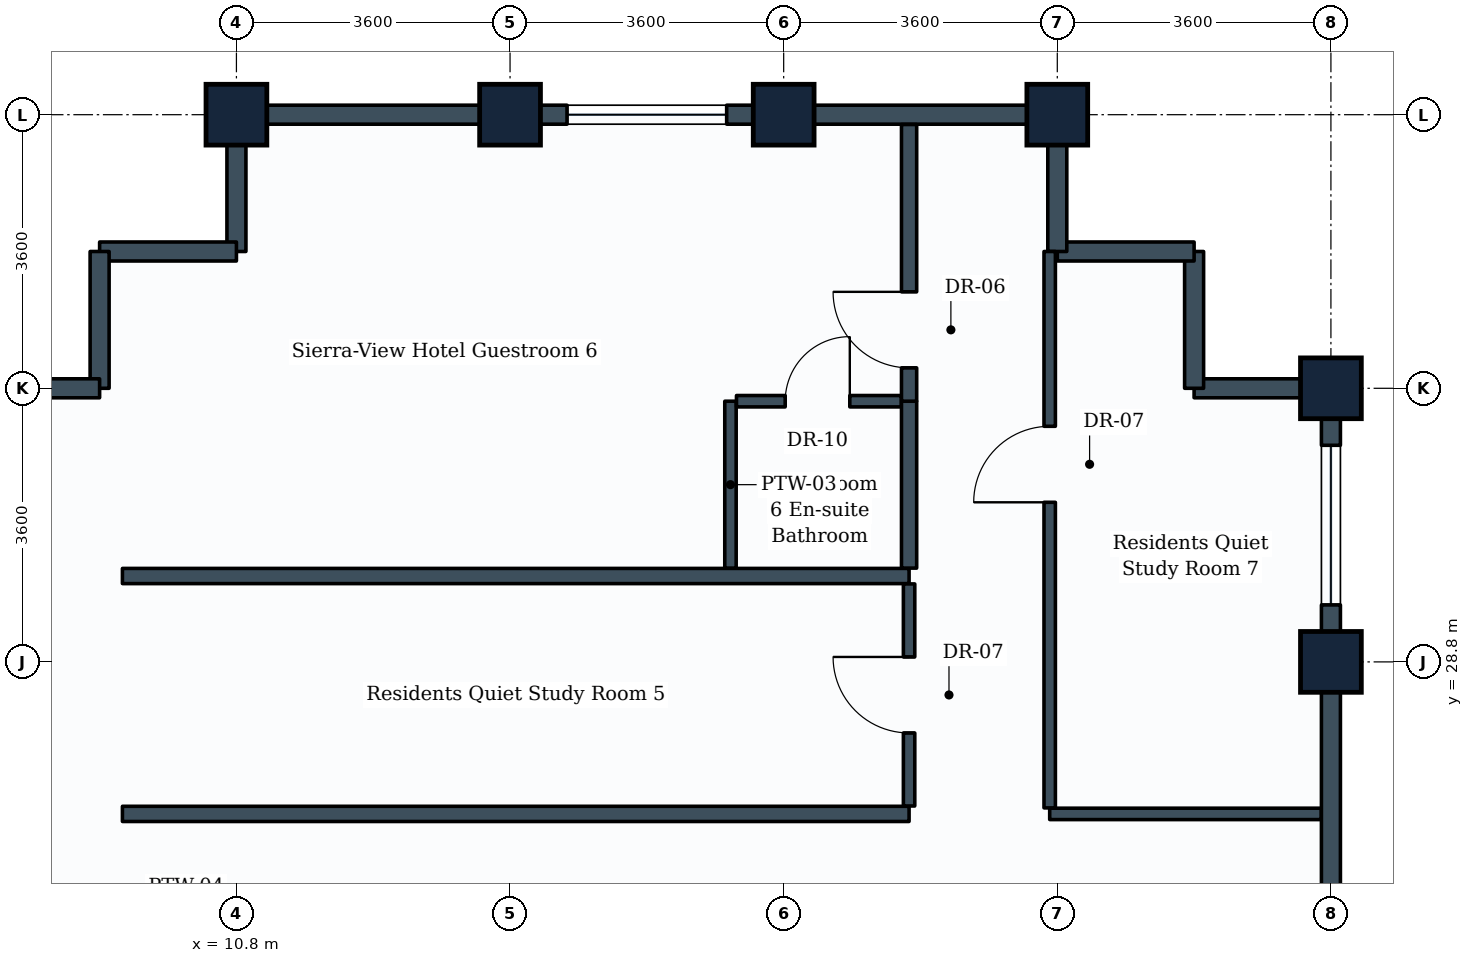
"""IFC4 building model, lengths in metres.
Left out: names, types, materials, properties, quantities, classifications, styles, units other than length and angle.
Written with IfcOpenShell. Run it as: python <this file> out.ifc"""

import sys

from ifc_helpers import new_model, si_unit, direction, frame, frame_2d, origin, origin_2d, place, context, subcontext, project, spatial, rectangle, extrude, element, fill, save


model = new_model("IFC4")
c1 = context("Model", 3, precision=1e-05, world=origin(), true_north=direction((0.0, 1.0)))
c2 = subcontext(c1, "Body", "Model", "MODEL_VIEW")
j1 = project(units=[si_unit("LENGTHUNIT", "METRE"), si_unit("PLANEANGLEUNIT", "RADIAN")], contexts=[c1])
p1 = place(None, origin())
s1 = spatial("IfcSite", under=j1, at=p1, CompositionType="ELEMENT")
p2 = place(p1, origin())
s2 = spatial("IfcBuilding", under=s1, at=p2, CompositionType="ELEMENT")
p3 = place(p2, frame((0.0, 0.0, 231.8)))
s3 = spatial("IfcBuildingStorey", under=s2, at=p3, CompositionType="ELEMENT", Elevation=231.8)
for number, where, z_axis, x_axis in (
    (1, (10.8, 36.0, 0.0), (0.0, 0.0, 1.0), (1.0, 0.0, 0.0)),
    (2, (14.4, 36.0, 0.0), (0.0, 0.0, 1.0), (1.0, 0.0, 0.0)),
    (3, (18.0, 36.0, 0.0), (0.0, 0.0, 1.0), (1.0, 0.0, 0.0)),
    (4, (21.6, 36.0, 0.0), (0.0, 0.0, 1.0), (1.0, 0.0, 0.0)),
    (5, (25.2, 28.8, 0.0), (0.0, 0.0, 1.0), (0.0, 1.0, 0.0)),
    (6, (25.2, 32.4, 0.0), (0.0, 0.0, 1.0), (0.0, 1.0, 0.0)),
):
    element("IfcColumn", number, at=place(p3, frame(where, z_axis=z_axis, x_axis=x_axis)), inside=s3, PredefinedType="COLUMN", context=c2, shape_type="SweptSolid", body=[
        extrude(rectangle(XDim=0.8, YDim=0.8, at=origin_2d()), origin(), (0.0, 0.0, 1.0), 3.6),
    ])
p4 = place(p3, frame((25.2, 28.8, 0.0), z_axis=(0.0, 0.0, 1.0), x_axis=(0.0, -1.0, 0.0)))
e7 = element("IfcWall", 7, at=p4, inside=s3, PredefinedType="STANDARD", context=c2, shape_type="SweptSolid", body=[
    extrude(rectangle(XDim=3.6, YDim=0.25, at=frame_2d((1.8, 0.0))), origin(), (0.0, 0.0, 1.0), 2.83),
])
p5 = place(p3, frame((25.2, 32.4, 0.0), z_axis=(0.0, 0.0, 1.0), x_axis=(0.0, -1.0, 0.0)))
e8 = element("IfcWall", 8, at=p5, inside=s3, PredefinedType="STANDARD", context=c2, shape_type="SweptSolid", body=[
    extrude(rectangle(XDim=3.6, YDim=0.25, at=frame_2d((1.8, 0.0))), origin(), (0.0, 0.0, 1.0), 2.83),
])
p6 = place(p5, frame((0.75, 0.0, 0.85)))
e9 = element("IfcOpeningElement", 9, at=p6, cuts=e8, PredefinedType="OPENING", context=c2, shape_type="SweptSolid", body=[
    extrude(rectangle(XDim=2.1, YDim=1.35, at=frame_2d((1.05, 0.675))), frame((0.0, 0.135, 0.0), z_axis=(0.0, -1.0, 0.0), x_axis=(1.0, 0.0, 0.0)), (0.0, 0.0, 1.0), 0.27),
])
p7 = place(p3, frame((23.4, 32.4, 0.0), z_axis=(0.0, 0.0, 1.0), x_axis=(1.0, 0.0, 0.0)))
e10 = element("IfcWall", 10, at=p7, inside=s3, PredefinedType="STANDARD", context=c2, shape_type="SweptSolid", body=[
    extrude(rectangle(XDim=1.8, YDim=0.25, at=frame_2d((0.9, 0.0))), origin(), (0.0, 0.0, 1.0), 2.83),
])
p8 = place(p3, frame((23.4, 32.4, 0.0), z_axis=(0.0, 0.0, 1.0), x_axis=(0.0, 1.0, 0.0)))
e11 = element("IfcWall", 11, at=p8, inside=s3, PredefinedType="STANDARD", context=c2, shape_type="SweptSolid", body=[
    extrude(rectangle(XDim=1.8, YDim=0.25, at=frame_2d((0.9, 0.0))), origin(), (0.0, 0.0, 1.0), 3.335),
])
p9 = place(p3, frame((21.6, 34.2, 0.0), z_axis=(0.0, 0.0, 1.0), x_axis=(1.0, 0.0, 0.0)))
e12 = element("IfcWall", 12, at=p9, inside=s3, PredefinedType="STANDARD", context=c2, shape_type="SweptSolid", body=[
    extrude(rectangle(XDim=1.8, YDim=0.25, at=frame_2d((0.9, 0.0))), origin(), (0.0, 0.0, 1.0), 3.335),
])
p10 = place(p3, frame((21.6, 34.2, 0.0), z_axis=(0.0, 0.0, 1.0), x_axis=(0.0, 1.0, 0.0)))
e13 = element("IfcWall", 13, at=p10, inside=s3, PredefinedType="STANDARD", context=c2, shape_type="SweptSolid", body=[
    extrude(rectangle(XDim=1.8, YDim=0.25, at=frame_2d((0.9, 0.0))), origin(), (0.0, 0.0, 1.0), 2.83),
])
p11 = place(p3, frame((18.0, 36.0, 0.0), z_axis=(0.0, 0.0, 1.0), x_axis=(1.0, 0.0, 0.0)))
e14 = element("IfcWall", 14, at=p11, inside=s3, PredefinedType="STANDARD", context=c2, shape_type="SweptSolid", body=[
    extrude(rectangle(XDim=3.6, YDim=0.25, at=frame_2d((1.8, 0.0))), origin(), (0.0, 0.0, 1.0), 2.83),
])
p12 = place(p3, frame((14.4, 36.0, 0.0), z_axis=(0.0, 0.0, 1.0), x_axis=(1.0, 0.0, 0.0)))
e15 = element("IfcWall", 15, at=p12, inside=s3, PredefinedType="STANDARD", context=c2, shape_type="SweptSolid", body=[
    extrude(rectangle(XDim=3.6, YDim=0.25, at=frame_2d((1.8, 0.0))), origin(), (0.0, 0.0, 1.0), 2.83),
])
p13 = place(p12, frame((0.75, 0.0, 0.85)))
e16 = element("IfcOpeningElement", 16, at=p13, cuts=e15, PredefinedType="OPENING", context=c2, shape_type="SweptSolid", body=[
    extrude(rectangle(XDim=2.1, YDim=1.35, at=frame_2d((1.05, 0.675))), frame((0.0, 0.135, 0.0), z_axis=(0.0, -1.0, 0.0), x_axis=(1.0, 0.0, 0.0)), (0.0, 0.0, 1.0), 0.27),
])
p14 = place(p3, frame((10.8, 36.0, 0.0), z_axis=(0.0, 0.0, 1.0), x_axis=(1.0, 0.0, 0.0)))
e17 = element("IfcWall", 17, at=p14, inside=s3, PredefinedType="STANDARD", context=c2, shape_type="SweptSolid", body=[
    extrude(rectangle(XDim=3.6, YDim=0.25, at=frame_2d((1.8, 0.0))), origin(), (0.0, 0.0, 1.0), 2.83),
])
p15 = place(p3, frame((10.8, 34.2, 0.0), z_axis=(0.0, 0.0, 1.0), x_axis=(0.0, 1.0, 0.0)))
e18 = element("IfcWall", 18, at=p15, inside=s3, PredefinedType="STANDARD", context=c2, shape_type="SweptSolid", body=[
    extrude(rectangle(XDim=1.8, YDim=0.25, at=frame_2d((0.9, 0.0))), origin(), (0.0, 0.0, 1.0), 2.83),
])
for number, where, z_axis, x_axis in (
    (19, (9.0, 34.2, 0.0), (0.0, 0.0, 1.0), (1.0, 0.0, 0.0)),
    (20, (9.0, 32.4, 0.0), (0.0, 0.0, 1.0), (0.0, 1.0, 0.0)),
):
    element("IfcWall", number, at=place(p3, frame(where, z_axis=z_axis, x_axis=x_axis)), inside=s3, PredefinedType="STANDARD", context=c2, shape_type="SweptSolid", body=[
        extrude(rectangle(XDim=1.8, YDim=0.25, at=frame_2d((0.9, 0.0))), origin(), (0.0, 0.0, 1.0), 3.335),
    ])
p16 = place(p3, frame((7.2, 32.4, 0.0), z_axis=(0.0, 0.0, 1.0), x_axis=(1.0, 0.0, 0.0)))
e21 = element("IfcWall", 21, at=p16, inside=s3, PredefinedType="STANDARD", context=c2, shape_type="SweptSolid", body=[
    extrude(rectangle(XDim=1.8, YDim=0.25, at=frame_2d((0.9, 0.0))), origin(), (0.0, 0.0, 1.0), 2.83),
])
for number, where, z_axis, x_axis in (
    (22, (9.3, 26.8, 0.0), (0.0, 0.0, 1.0), (1.0, 0.0, 0.0)),
    (23, (9.3, 29.93, 0.0), (0.0, 0.0, 1.0), (1.0, 0.0, 0.0)),
):
    element("IfcWall", number, at=place(p3, frame(where, z_axis=z_axis, x_axis=x_axis)), inside=s3, PredefinedType="PARTITIONING", context=c2, shape_type="SweptSolid", body=[
        extrude(rectangle(XDim=10.35, YDim=0.2, at=frame_2d((5.175, 0.0))), origin(), (0.0, 0.0, 1.0), 3.03),
    ])
p17 = place(p3, frame((19.65, 26.904, 0.0), z_axis=(0.0, 0.0, 1.0), x_axis=(0.0, 1.0, 0.0)))
e24 = element("IfcWall", 24, at=p17, inside=s3, PredefinedType="PARTITIONING", context=c2, shape_type="SweptSolid", body=[
    extrude(rectangle(XDim=2.922, YDim=0.15, at=frame_2d((1.461, 0.0))), origin(), (0.0, 0.0, 1.0), 3.03),
])
p18 = place(p17, frame((0.961, 0.0, 0.0)))
e25 = element("IfcOpeningElement", 25, at=p18, cuts=e24, PredefinedType="OPENING", context=c2, shape_type="SweptSolid", body=[
    extrude(rectangle(XDim=1.0, YDim=2.1, at=frame_2d((0.5, 1.05))), frame((0.0, 0.085, 0.0), z_axis=(0.0, -1.0, 0.0), x_axis=(1.0, 0.0, 0.0)), (0.0, 0.0, 1.0), 0.17),
])
p19 = place(p3, frame((19.65, 30.034, 0.0), z_axis=(0.0, 0.0, 1.0), x_axis=(0.0, 1.0, 0.0)))
e26 = element("IfcWall", 26, at=p19, inside=s3, PredefinedType="PARTITIONING", context=c2, shape_type="SweptSolid", body=[
    extrude(rectangle(XDim=2.196, YDim=0.2, at=frame_2d((1.098, 0.0))), origin(), (0.0, 0.0, 1.0), 3.335),
])
p20 = place(p3, frame((19.65, 32.23, 0.0), z_axis=(0.0, 0.0, 1.0), x_axis=(0.0, 1.0, 0.0)))
e27 = element("IfcWall", 27, at=p20, inside=s3, PredefinedType="PARTITIONING", context=c2, shape_type="SweptSolid", body=[
    extrude(rectangle(XDim=3.641, YDim=0.2, at=frame_2d((1.821, 0.0))), origin(), (0.0, 0.0, 1.0), 2.83),
])
p21 = place(p20, frame((0.439, 0.0, 0.0)))
e28 = element("IfcOpeningElement", 28, at=p21, cuts=e27, PredefinedType="OPENING", context=c2, shape_type="SweptSolid", body=[
    extrude(rectangle(XDim=1.0, YDim=2.1, at=frame_2d((0.5, 1.05))), frame((0.0, 0.11, 0.0), z_axis=(0.0, -1.0, 0.0), x_axis=(1.0, 0.0, 0.0)), (0.0, 0.0, 1.0), 0.22),
])
p22 = place(p3, frame((17.3, 30.034, 0.0), z_axis=(0.0, 0.0, 1.0), x_axis=(0.0, 1.0, 0.0)))
e29 = element("IfcWall", 29, at=p22, inside=s3, PredefinedType="PARTITIONING", context=c2, shape_type="SweptSolid", body=[
    extrude(rectangle(XDim=2.196, YDim=0.15, at=frame_2d((1.098, 0.0))), origin(), (0.0, 0.0, 1.0), 3.335),
])
p23 = place(p3, frame((17.379, 32.23, 0.0), z_axis=(0.0, 0.0, 1.0), x_axis=(1.0, 0.0, 0.0)))
e30 = element("IfcWall", 30, at=p23, inside=s3, PredefinedType="PARTITIONING", context=c2, shape_type="SweptSolid", body=[
    extrude(rectangle(XDim=2.167, YDim=0.15, at=frame_2d((1.083, 0.0))), origin(), (0.0, 0.0, 1.0), 3.03),
])
p24 = place(p23, frame((0.641, 0.0, 0.0)))
e31 = element("IfcOpeningElement", 31, at=p24, cuts=e30, PredefinedType="OPENING", context=c2, shape_type="SweptSolid", body=[
    extrude(rectangle(XDim=0.85, YDim=2.1, at=frame_2d((0.425, 1.05))), frame((0.0, 0.085, 0.0), z_axis=(0.0, -1.0, 0.0), x_axis=(1.0, 0.0, 0.0)), (0.0, 0.0, 1.0), 0.17),
])
p25 = place(p3, frame((21.5, 26.8, 0.0), z_axis=(0.0, 0.0, 1.0), x_axis=(1.0, 0.0, 0.0)))
e32 = element("IfcWall", 32, at=p25, inside=s3, PredefinedType="PARTITIONING", context=c2, shape_type="SweptSolid", body=[
    extrude(rectangle(XDim=3.571, YDim=0.15, at=frame_2d((1.786, 0.0))), origin(), (0.0, 0.0, 1.0), 2.83),
])
p26 = place(p3, frame((21.5, 26.879, 0.0), z_axis=(0.0, 0.0, 1.0), x_axis=(0.0, 1.0, 0.0)))
e33 = element("IfcWall", 33, at=p26, inside=s3, PredefinedType="PARTITIONING", context=c2, shape_type="SweptSolid", body=[
    extrude(rectangle(XDim=7.321, YDim=0.15, at=frame_2d((3.661, 0.0))), origin(), (0.0, 0.0, 1.0), 3.03),
])
p27 = place(p26, frame((4.021, 0.0, 0.0)))
e34 = element("IfcOpeningElement", 34, at=p27, cuts=e33, PredefinedType="OPENING", context=c2, shape_type="SweptSolid", body=[
    extrude(rectangle(XDim=1.0, YDim=2.1, at=frame_2d((0.5, 1.05))), frame((0.0, 0.085, 0.0), z_axis=(0.0, -1.0, 0.0), x_axis=(1.0, 0.0, 0.0)), (0.0, 0.0, 1.0), 0.17),
])
p28 = place(p6, origin())
e35 = element("IfcWindow", 35, at=p28, inside=s3, PartitioningType="SINGLE_PANEL", PredefinedType="WINDOW", context=c2, shape_type="SweptSolid", body=[
    extrude(rectangle(XDim=2.1, YDim=1.35, at=frame_2d((1.05, 0.675))), frame((0.0, 0.03, 0.0), z_axis=(0.0, -1.0, 0.0), x_axis=(1.0, 0.0, 0.0)), (0.0, 0.0, 1.0), 0.06),
])
fill(e9, e35)
p29 = place(p13, origin())
e36 = element("IfcWindow", 36, at=p29, inside=s3, PartitioningType="SINGLE_PANEL", PredefinedType="WINDOW", context=c2, shape_type="SweptSolid", body=[
    extrude(rectangle(XDim=2.1, YDim=1.35, at=frame_2d((1.05, 0.675))), frame((0.0, 0.03, 0.0), z_axis=(0.0, -1.0, 0.0), x_axis=(1.0, 0.0, 0.0)), (0.0, 0.0, 1.0), 0.06),
])
fill(e16, e36)
p30 = place(p18, origin())
e37 = element("IfcDoor", 37, at=p30, inside=s3, OperationType="SINGLE_SWING_RIGHT", PredefinedType="DOOR", context=c2, shape_type="SweptSolid", body=[
    extrude(rectangle(XDim=1.0, YDim=2.1, at=frame_2d((0.5, 1.05))), frame((0.0, 0.025, 0.0), z_axis=(0.0, -1.0, 0.0), x_axis=(1.0, 0.0, 0.0)), (0.0, 0.0, 1.0), 0.05),
])
fill(e25, e37)
p31 = place(p21, origin())
e38 = element("IfcDoor", 38, at=p31, inside=s3, OperationType="SINGLE_SWING_RIGHT", PredefinedType="DOOR", context=c2, shape_type="SweptSolid", body=[
    extrude(rectangle(XDim=1.0, YDim=2.1, at=frame_2d((0.5, 1.05))), frame((0.0, 0.025, 0.0), z_axis=(0.0, -1.0, 0.0), x_axis=(1.0, 0.0, 0.0)), (0.0, 0.0, 1.0), 0.05),
])
fill(e28, e38)
p32 = place(p24, origin())
e39 = element("IfcDoor", 39, at=p32, inside=s3, OperationType="SINGLE_SWING_RIGHT", PredefinedType="DOOR", context=c2, shape_type="SweptSolid", body=[
    extrude(rectangle(XDim=0.85, YDim=2.1, at=frame_2d((0.425, 1.05))), frame((0.0, 0.025, 0.0), z_axis=(0.0, -1.0, 0.0), x_axis=(1.0, 0.0, 0.0)), (0.0, 0.0, 1.0), 0.05),
])
fill(e31, e39)
p33 = place(p27, origin())
e40 = element("IfcDoor", 40, at=p33, inside=s3, OperationType="SINGLE_SWING_LEFT", PredefinedType="DOOR", context=c2, shape_type="SweptSolid", body=[
    extrude(rectangle(XDim=1.0, YDim=2.1, at=frame_2d((0.5, 1.05))), frame((0.0, 0.025, 0.0), z_axis=(0.0, -1.0, 0.0), x_axis=(1.0, 0.0, 0.0)), (0.0, 0.0, 1.0), 0.05),
])
fill(e34, e40)
save(model, sys.argv[1])
